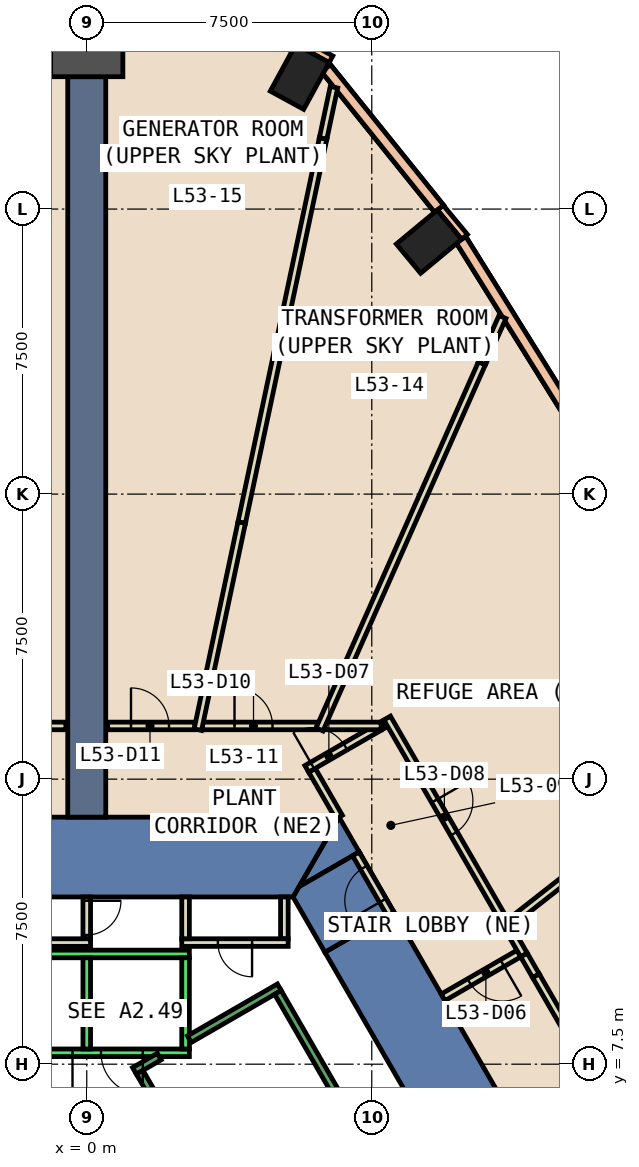
"""IFC4 building model, lengths in metres.
Left out: names, types, materials, properties, quantities, classifications, styles, units other than length and angle.
Written with IfcOpenShell. Run it as: python <this file> out.ifc"""

import sys

from ifc_helpers import new_model, si_unit, direction, frame, frame_2d, origin, origin_2d, place, context, subcontext, project, spatial, polyline, rectangle, outline, extrude, element, fill, save


model = new_model("IFC4")
c1 = context("Model", 3, precision=1e-05, world=origin(), true_north=direction((0.0, 1.0)))
c2 = subcontext(c1, "Body", "Model", "MODEL_VIEW")
j1 = project(units=[si_unit("LENGTHUNIT", "METRE"), si_unit("PLANEANGLEUNIT", "RADIAN")], contexts=[c1])
p1 = place(None, origin())
s1 = spatial("IfcSite", under=j1, at=p1, CompositionType="ELEMENT")
p2 = place(p1, origin())
s2 = spatial("IfcBuilding", under=s1, at=p2, CompositionType="ELEMENT")
p3 = place(p2, frame((0.0, 0.0, 236.0)))
s3 = spatial("IfcBuildingStorey", under=s2, at=p3, CompositionType="ELEMENT", Elevation=236.0)
for number, where, z_axis, x_axis in (
    (1, (9.005, 29.143, -0.6), (0.0, 0.0, 1.0), (-0.639, 0.769, 0.0)),
    (2, (5.604, 33.479, -0.6), (0.0, 0.0, 1.0), (-0.878, 0.478, 0.0)),
):
    element("IfcColumn", number, at=place(p3, frame(where, z_axis=z_axis, x_axis=x_axis)), inside=s3, PredefinedType="COLUMN", context=c2, shape_type="SweptSolid", body=[
        extrude(rectangle(XDim=1.0, YDim=1.4, at=origin_2d()), origin(), (0.0, 0.0, 1.0), 5.4),
    ])
p4 = place(p3, frame((0.0, 34.433, -0.6), z_axis=(0.0, 0.0, 1.0), x_axis=(0.0, 1.0, 0.0)))
e3 = element("IfcColumn", 3, at=p4, inside=s3, PredefinedType="COLUMN", context=c2, shape_type="SweptSolid", body=[
    extrude(rectangle(XDim=1.9, YDim=1.9, at=origin_2d()), origin(), (0.0, 0.0, 1.0), 5.4),
])
p5 = place(p3, frame((0.0, 0.0, -0.6)))
e4 = element("IfcWall", 4, at=p5, inside=s3, PredefinedType="SHEAR", context=c2, shape_type="SweptSolid", body=[
    extrude(outline(polyline([(8.085, 11.498), (6.266, 10.447), (10.854, 2.5), (13.279, 2.5), (8.085, 11.498)])), origin(), (0.0, 0.0, 1.0), 5.4),
])
p6 = place(p3, frame((0.0, 0.0, -0.6)))
e5 = element("IfcWall", 5, at=p6, inside=s3, PredefinedType="SHEAR", context=c2, shape_type="SweptSolid", body=[
    extrude(outline(polyline([(5.58, 12.165), (7.17, 13.083), (6.64, 14.0), (5.58, 12.165)])), origin(), (0.0, 0.0, 1.0), 5.4),
])
p7 = place(p3, frame((0.0, 0.0, 3.6)))
e6 = element("IfcWall", 6, at=p7, inside=s3, PredefinedType="SHEAR", context=c2, shape_type="SweptSolid", body=[
    extrude(outline(polyline([(7.17, 13.083), (5.58, 12.165), (5.427, 11.9), (6.266, 10.447), (8.085, 11.498), (7.17, 13.083)])), origin(), (0.0, 0.0, 1.0), 1.2),
])
p8 = place(p3, frame((0.0, 0.0, -0.6)))
e7 = element("IfcWall", 7, at=p8, inside=s3, PredefinedType="SHEAR", context=c2, shape_type="SweptSolid", body=[
    extrude(outline(polyline([(6.64, 14.0), (-6.64, 14.0), (-5.427, 11.9), (5.427, 11.9), (6.64, 14.0)])), origin(), (0.0, 0.0, 1.0), 5.4),
])
p9 = place(p3, frame((0.0, 14.0, 0.0), z_axis=(0.0, 0.0, 1.0), x_axis=(0.0, 1.0, 0.0)))
e8 = element("IfcWall", 8, at=p9, inside=s3, PredefinedType="SHEAR", context=c2, shape_type="SweptSolid", body=[
    extrude(rectangle(XDim=19.483, YDim=1.0, at=frame_2d((9.741, 0.0))), origin(), (0.0, 0.0, 1.0), 4.8),
])
p10 = place(p3, frame((6.426, 33.942, 0.0), z_axis=(0.0, 0.0, 1.0), x_axis=(-0.878250009632, 0.478201757191, 0.0)))
e9 = element("IfcWall", 9, at=p10, inside=s3, PredefinedType="STANDARD", context=c2, shape_type="SweptSolid", body=[
    extrude(rectangle(XDim=1.0, YDim=0.2, at=frame_2d((0.5, 0.0))), origin(), (0.0, 0.0, 1.0), 4.8),
])
p11 = place(p3, frame((9.94, 29.269, 0.0), z_axis=(0.0, 0.0, 1.0), x_axis=(-0.637972365578, 0.770059257953, 0.0)))
e10 = element("IfcWall", 10, at=p11, inside=s3, PredefinedType="STANDARD", context=c2, shape_type="SweptSolid", body=[
    extrude(rectangle(XDim=1.0, YDim=0.2, at=frame_2d((0.5, 0.0))), origin(), (0.0, 0.0, 1.0), 4.8),
])
p12 = place(p3, frame((13.799, 22.855, 0.0), z_axis=(0.0, 0.0, 1.0), x_axis=(-0.528961462244, 0.848645845722, 0.0)))
e11 = element("IfcWall", 11, at=p12, inside=s3, PredefinedType="STANDARD", context=c2, shape_type="SweptSolid", body=[
    extrude(rectangle(XDim=7.47, YDim=0.3, at=frame_2d((3.735, 0.0))), origin(), (0.0, 0.0, 1.0), 1.2),
])
p13 = place(p3, frame((13.799, 22.855, 4.0), z_axis=(0.0, 0.0, 1.0), x_axis=(-0.528961462244, 0.848645845722, 0.0)))
e12 = element("IfcWall", 12, at=p13, inside=s3, PredefinedType="STANDARD", context=c2, shape_type="SweptSolid", body=[
    extrude(rectangle(XDim=7.47, YDim=0.3, at=frame_2d((3.735, 0.0))), origin(), (0.0, 0.0, 1.0), 0.8),
])
p14 = place(p3, frame((9.27, 30.011, 0.0), z_axis=(0.0, 0.0, 1.0), x_axis=(-0.627115312033, 0.778926431323, 0.0)))
e13 = element("IfcWall", 13, at=p14, inside=s3, PredefinedType="STANDARD", context=c2, shape_type="SweptSolid", body=[
    extrude(rectangle(XDim=4.742, YDim=0.3, at=frame_2d((2.371, 0.0))), origin(), (0.0, 0.0, 1.0), 1.2),
])
p15 = place(p3, frame((9.27, 30.011, 4.0), z_axis=(0.0, 0.0, 1.0), x_axis=(-0.627115312033, 0.778926431323, 0.0)))
e14 = element("IfcWall", 14, at=p15, inside=s3, PredefinedType="STANDARD", context=c2, shape_type="SweptSolid", body=[
    extrude(rectangle(XDim=4.742, YDim=0.3, at=frame_2d((2.371, 0.0))), origin(), (0.0, 0.0, 1.0), 0.8),
])
p16 = place(p3, frame((5.2, 11.9, 0.0), z_axis=(0.0, 0.0, 1.0), x_axis=(0.0, -1.0, 0.0)))
e15 = element("IfcWall", 15, at=p16, inside=s3, PredefinedType="PARTITIONING", context=c2, shape_type="SweptSolid", body=[
    extrude(rectangle(XDim=1.1, YDim=0.2, at=frame_2d((0.55, 0.0))), origin(), (0.0, 0.0, 1.0), 4.8),
])
p17 = place(p3, frame((5.3, 10.7, 0.0), z_axis=(0.0, 0.0, 1.0), x_axis=(-1.0, 0.0, 0.0)))
e16 = element("IfcWall", 16, at=p17, inside=s3, PredefinedType="PARTITIONING", context=c2, shape_type="SweptSolid", body=[
    extrude(rectangle(XDim=2.8, YDim=0.2, at=frame_2d((1.4, 0.0))), origin(), (0.0, 0.0, 1.0), 4.8),
])
p18 = place(p17, frame((0.95, 0.0, 0.0)))
e17 = element("IfcOpeningElement", 17, at=p18, cuts=e16, PredefinedType="OPENING", context=c2, shape_type="SweptSolid", body=[
    extrude(rectangle(XDim=0.9, YDim=2.1, at=frame_2d((0.45, 1.05))), frame((0.0, 0.11, 0.0), z_axis=(0.0, -1.0, 0.0), x_axis=(1.0, 0.0, 0.0)), (0.0, 0.0, 1.0), 0.22),
])
p19 = place(p3, frame((2.6, 10.8, 0.0), z_axis=(0.0, 0.0, 1.0), x_axis=(0.0, 1.0, 0.0)))
e18 = element("IfcWall", 18, at=p19, inside=s3, PredefinedType="PARTITIONING", context=c2, shape_type="SweptSolid", body=[
    extrude(rectangle(XDim=1.1, YDim=0.2, at=frame_2d((0.55, 0.0))), origin(), (0.0, 0.0, 1.0), 4.8),
])
p20 = place(p3, frame((0.0, 11.9, 0.0), z_axis=(0.0, 0.0, 1.0), x_axis=(0.0, -1.0, 0.0)))
e19 = element("IfcWall", 19, at=p20, inside=s3, PredefinedType="PARTITIONING", context=c2, shape_type="SweptSolid", body=[
    extrude(rectangle(XDim=1.1, YDim=0.2, at=frame_2d((0.55, 0.0))), origin(), (0.0, 0.0, 1.0), 4.8),
])
p21 = place(p20, frame((0.1, 0.0, 0.0)))
e20 = element("IfcOpeningElement", 20, at=p21, cuts=e19, PredefinedType="OPENING", context=c2, shape_type="SweptSolid", body=[
    extrude(rectangle(XDim=0.9, YDim=2.1, at=frame_2d((0.45, 1.05))), frame((0.0, 0.11, 0.0), z_axis=(0.0, -1.0, 0.0), x_axis=(1.0, 0.0, 0.0)), (0.0, 0.0, 1.0), 0.22),
])
p22 = place(p3, frame((0.1, 10.7, 0.0), z_axis=(0.0, 0.0, 1.0), x_axis=(-1.0, 0.0, 0.0)))
e21 = element("IfcWall", 21, at=p22, inside=s3, PredefinedType="PARTITIONING", context=c2, shape_type="SweptSolid", body=[
    extrude(rectangle(XDim=2.8, YDim=0.2, at=frame_2d((1.4, 0.0))), origin(), (0.0, 0.0, 1.0), 4.8),
])
p23 = place(p3, frame((11.455, 10.459, 0.0), z_axis=(0.0, 0.0, 1.0), x_axis=(-0.865999212041, -0.500045362686, 0.0)))
e22 = element("IfcWall", 22, at=p23, inside=s3, PredefinedType="PARTITIONING", context=c2, shape_type="SweptSolid", body=[
    extrude(rectangle(XDim=2.4, YDim=0.2, at=frame_2d((1.2, 0.0))), origin(), (0.0, 0.0, 1.0), 2.4),
])
p24 = place(p23, frame((0.6, 0.0, 0.0)))
e23 = element("IfcOpeningElement", 23, at=p24, cuts=e22, PredefinedType="OPENING", context=c2, shape_type="SweptSolid", body=[
    extrude(rectangle(XDim=1.0, YDim=2.1, at=frame_2d((0.5, 1.05))), frame((0.0, 0.11, 0.0), z_axis=(0.0, -1.0, 0.0), x_axis=(1.0, 0.0, 0.0)), (0.0, 0.0, 1.0), 0.22),
])
p25 = place(p3, frame((6.64, 14.0, 0.0), z_axis=(0.0, 0.0, 1.0), x_axis=(-0.500266180458, 0.865871669874, 0.0)))
e24 = element("IfcWall", 24, at=p25, inside=s3, PredefinedType="PARTITIONING", context=c2, shape_type="SweptSolid", body=[
    extrude(rectangle(XDim=1.425, YDim=0.2, at=frame_2d((0.712, 0.0))), origin(), (0.0, 0.0, 1.0), 4.8),
])
p26 = place(p3, frame((5.79, 15.271, 0.0), z_axis=(0.0, 0.0, 1.0), x_axis=(0.866023505087, 0.500003288626, 0.0)))
e25 = element("IfcWall", 25, at=p26, inside=s3, PredefinedType="PARTITIONING", context=c2, shape_type="SweptSolid", body=[
    extrude(rectangle(XDim=2.358, YDim=0.2, at=frame_2d((1.179, 0.0))), origin(), (0.0, 0.0, 1.0), 4.8),
])
p27 = place(p26, frame((0.171, 0.0, 0.0)))
e26 = element("IfcOpeningElement", 26, at=p27, cuts=e25, PredefinedType="OPENING", context=c2, shape_type="SweptSolid", body=[
    extrude(rectangle(XDim=1.0, YDim=2.1, at=frame_2d((0.5, 1.05))), frame((0.0, 0.11, 0.0), z_axis=(0.0, -1.0, 0.0), x_axis=(1.0, 0.0, 0.0)), (0.0, 0.0, 1.0), 0.22),
])
p28 = place(p3, frame((7.905, 16.608, 0.0), z_axis=(0.0, 0.0, 1.0), x_axis=(0.499957262057, -0.866050077142, 0.0)))
e27 = element("IfcWall", 27, at=p28, inside=s3, PredefinedType="PARTITIONING", context=c2, shape_type="SweptSolid", body=[
    extrude(rectangle(XDim=7.2, YDim=0.2, at=frame_2d((3.6, 0.0))), origin(), (0.0, 0.0, 1.0), 4.8),
])
p29 = place(p28, frame((2.512, 0.0, 0.0)))
e28 = element("IfcOpeningElement", 28, at=p29, cuts=e27, PredefinedType="OPENING", context=c2, shape_type="SweptSolid", body=[
    extrude(rectangle(XDim=1.0, YDim=2.1, at=frame_2d((0.5, 1.05))), frame((0.0, 0.11, 0.0), z_axis=(0.0, -1.0, 0.0), x_axis=(1.0, 0.0, 0.0)), (0.0, 0.0, 1.0), 0.22),
])
p30 = place(p3, frame((11.505, 10.372, 0.0), z_axis=(0.0, 0.0, 1.0), x_axis=(0.500335529221, -0.865831599215, 0.0)))
e29 = element("IfcWall", 29, at=p30, inside=s3, PredefinedType="PARTITIONING", context=c2, shape_type="SweptSolid", body=[
    extrude(rectangle(XDim=0.632, YDim=0.2, at=frame_2d((0.316, 0.0))), origin(), (0.0, 0.0, 1.0), 2.4),
])
p31 = place(p3, frame((6.266, 16.4, 0.0), z_axis=(0.0, 0.0, 1.0), x_axis=(1.0, 0.0, 0.0)))
e30 = element("IfcWall", 30, at=p31, inside=s3, PredefinedType="PARTITIONING", context=c2, shape_type="SweptSolid", body=[
    extrude(rectangle(XDim=1.479, YDim=0.2, at=frame_2d((0.74, 0.0))), origin(), (0.0, 0.0, 1.0), 4.8),
])
p32 = place(p3, frame((3.044, 16.4, 0.0), z_axis=(0.0, 0.0, 1.0), x_axis=(1.0, 0.0, 0.0)))
e31 = element("IfcWall", 31, at=p32, inside=s3, PredefinedType="PARTITIONING", context=c2, shape_type="SweptSolid", body=[
    extrude(rectangle(XDim=3.022, YDim=0.2, at=frame_2d((1.511, 0.0))), origin(), (0.0, 0.0, 1.0), 4.8),
])
p33 = place(p32, frame((0.844, 0.0, 0.0)))
e32 = element("IfcOpeningElement", 32, at=p33, cuts=e31, PredefinedType="OPENING", context=c2, shape_type="SweptSolid", body=[
    extrude(rectangle(XDim=1.0, YDim=2.1, at=frame_2d((0.5, 1.05))), frame((0.0, 0.11, 0.0), z_axis=(0.0, -1.0, 0.0), x_axis=(1.0, 0.0, 0.0)), (0.0, 0.0, 1.0), 0.22),
])
p34 = place(p3, frame((0.55, 16.4, 0.0), z_axis=(0.0, 0.0, 1.0), x_axis=(1.0, 0.0, 0.0)))
e33 = element("IfcWall", 33, at=p34, inside=s3, PredefinedType="PARTITIONING", context=c2, shape_type="SweptSolid", body=[
    extrude(rectangle(XDim=2.294, YDim=0.2, at=frame_2d((1.147, 0.0))), origin(), (0.0, 0.0, 1.0), 4.8),
])
p35 = place(p34, frame((0.614, 0.0, 0.0)))
e34 = element("IfcOpeningElement", 34, at=p35, cuts=e33, PredefinedType="OPENING", context=c2, shape_type="SweptSolid", body=[
    extrude(rectangle(XDim=1.0, YDim=2.1, at=frame_2d((0.5, 1.05))), frame((0.0, 0.11, 0.0), z_axis=(0.0, -1.0, 0.0), x_axis=(1.0, 0.0, 0.0)), (0.0, 0.0, 1.0), 0.22),
])
p36 = place(p3, frame((6.125, 16.309, 0.0), z_axis=(0.0, 0.0, 1.0), x_axis=(0.405480740136, 0.914103587882, 0.0)))
e35 = element("IfcWall", 35, at=p36, inside=s3, PredefinedType="PARTITIONING", context=c2, shape_type="SweptSolid", body=[
    extrude(rectangle(XDim=10.54, YDim=0.2, at=frame_2d((5.27, 0.0))), origin(), (0.0, 0.0, 1.0), 4.8),
])
p37 = place(p3, frame((2.923, 16.302, 0.0), z_axis=(0.0, 0.0, 1.0), x_axis=(0.207251352571, 0.97828772703, 0.0)))
e36 = element("IfcWall", 36, at=p37, inside=s3, PredefinedType="PARTITIONING", context=c2, shape_type="SweptSolid", body=[
    extrude(rectangle(XDim=5.572, YDim=0.2, at=frame_2d((2.786, 0.0))), origin(), (0.0, 0.0, 1.0), 2.4),
])
p38 = place(p3, frame((7.998, 11.448, 0.0), z_axis=(0.0, 0.0, 1.0), x_axis=(-0.500215337403, 0.865901042976, 0.0)))
e37 = element("IfcWall", 37, at=p38, inside=s3, PredefinedType="PARTITIONING", context=c2, shape_type="SweptSolid", body=[
    extrude(rectangle(XDim=1.829, YDim=0.2, at=frame_2d((0.915, 0.0))), origin(), (0.0, 0.0, 1.0), 2.4),
])
p39 = place(p38, frame((0.415, 0.0, 0.0)))
e38 = element("IfcOpeningElement", 38, at=p39, cuts=e37, PredefinedType="OPENING", context=c2, shape_type="SweptSolid", body=[
    extrude(rectangle(XDim=1.0, YDim=2.1, at=frame_2d((0.5, 1.05))), frame((0.0, 0.11, 0.0), z_axis=(0.0, -1.0, 0.0), x_axis=(1.0, 0.0, 0.0)), (0.0, 0.0, 1.0), 0.22),
])
p40 = place(p3, frame((11.821, 9.825, 0.0), z_axis=(0.0, 0.0, 1.0), x_axis=(0.500015573243, -0.866016412382, 0.0)))
e39 = element("IfcWall", 39, at=p40, inside=s3, PredefinedType="PARTITIONING", context=c2, shape_type="SweptSolid", body=[
    extrude(rectangle(XDim=4.254, YDim=0.2, at=frame_2d((2.127, 0.0))), origin(), (0.0, 0.0, 1.0), 4.8),
])
p41 = place(p3, frame((16.738, 15.615, 0.0), z_axis=(0.0, 0.0, 1.0), x_axis=(-0.787145477979, -0.616767376323, 0.0)))
e40 = element("IfcWall", 40, at=p41, inside=s3, PredefinedType="PARTITIONING", context=c2, shape_type="SweptSolid", body=[
    extrude(rectangle(XDim=7.225, YDim=0.2, at=frame_2d((3.612, 0.0))), origin(), (0.0, 0.0, 1.0), 4.8),
])
p42 = place(p3, frame((10.399, 25.944, 0.0), z_axis=(0.0, 0.0, 1.0), x_axis=(0.405661971111, 0.914023175414, 0.0)))
e41 = element("IfcWall", 41, at=p42, inside=s3, PredefinedType="PARTITIONING", context=c2, shape_type="SweptSolid", body=[
    extrude(rectangle(XDim=1.331, YDim=0.2, at=frame_2d((0.666, 0.0))), origin(), (0.0, 0.0, 1.0), 2.4),
])
p43 = place(p3, frame((4.078, 21.753, 0.0), z_axis=(0.0, 0.0, 1.0), x_axis=(0.207313040937, 0.978274656248, 0.0)))
e42 = element("IfcWall", 42, at=p43, inside=s3, PredefinedType="PARTITIONING", context=c2, shape_type="SweptSolid", body=[
    extrude(rectangle(XDim=10.333, YDim=0.2, at=frame_2d((5.166, 0.0))), origin(), (0.0, 0.0, 1.0), 4.8),
])
p44 = place(p3, frame((6.22, 31.861, 0.0), z_axis=(0.0, 0.0, 1.0), x_axis=(0.207236425439, 0.978290889241, 0.0)))
e43 = element("IfcWall", 43, at=p44, inside=s3, PredefinedType="PARTITIONING", context=c2, shape_type="SweptSolid", body=[
    extrude(rectangle(XDim=1.375, YDim=0.2, at=frame_2d((0.688, 0.0))), origin(), (0.0, 0.0, 1.0), 2.4),
])
p45 = place(p3, frame((-2.065, 16.4, 0.0), z_axis=(0.0, 0.0, 1.0), x_axis=(1.0, 0.0, 0.0)))
e44 = element("IfcWall", 44, at=p45, inside=s3, PredefinedType="PARTITIONING", context=c2, shape_type="SweptSolid", body=[
    extrude(rectangle(XDim=1.515, YDim=0.2, at=frame_2d((0.757, 0.0))), origin(), (0.0, 0.0, 1.0), 4.8),
])
p46 = place(p3, frame((2.7, 7.8, 0.0), z_axis=(0.0, 0.0, 1.0), x_axis=(-1.0, 0.0, 0.0)))
e45 = element("IfcWall", 45, at=p46, inside=s3, PredefinedType="STANDARD", context=c2, shape_type="SweptSolid", body=[
    extrude(rectangle(XDim=5.4, YDim=0.2, at=frame_2d((2.7, 0.0))), origin(), (0.0, 0.0, 1.0), 4.8),
])
p47 = place(p46, frame((1.225, 0.0, 0.0)))
e46 = element("IfcOpeningElement", 46, at=p47, cuts=e45, PredefinedType="OPENING", context=c2, shape_type="SweptSolid", body=[
    extrude(rectangle(XDim=1.1, YDim=2.1, at=frame_2d((0.55, 1.05))), frame((0.0, 0.11, 0.0), z_axis=(0.0, -1.0, 0.0), x_axis=(1.0, 0.0, 0.0)), (0.0, 0.0, 1.0), 0.22),
])
p48 = place(p46, frame((3.075, 0.0, 0.0)))
e47 = element("IfcOpeningElement", 47, at=p48, cuts=e45, PredefinedType="OPENING", context=c2, shape_type="SweptSolid", body=[
    extrude(rectangle(XDim=1.1, YDim=2.1, at=frame_2d((0.55, 1.05))), frame((0.0, 0.11, 0.0), z_axis=(0.0, -1.0, 0.0), x_axis=(1.0, 0.0, 0.0)), (0.0, 0.0, 1.0), 0.22),
])
p49 = place(p3, frame((2.7, 10.4, 0.0), z_axis=(0.0, 0.0, 1.0), x_axis=(-1.0, 0.0, 0.0)))
e48 = element("IfcWall", 48, at=p49, inside=s3, PredefinedType="STANDARD", context=c2, shape_type="SweptSolid", body=[
    extrude(rectangle(XDim=5.4, YDim=0.2, at=frame_2d((2.7, 0.0))), origin(), (0.0, 0.0, 1.0), 4.8),
])
for number, where, z_axis, x_axis in (
    (49, (2.6, 7.9, 0.0), (0.0, 0.0, 1.0), (0.0, 1.0, 0.0)),
    (50, (0.0, 7.9, 0.0), (0.0, 0.0, 1.0), (0.0, 1.0, 0.0)),
):
    element("IfcWall", number, at=place(p3, frame(where, z_axis=z_axis, x_axis=x_axis)), inside=s3, PredefinedType="STANDARD", context=c2, shape_type="SweptSolid", body=[
        extrude(rectangle(XDim=2.4, YDim=0.2, at=frame_2d((1.2, 0.0))), origin(), (0.0, 0.0, 1.0), 4.8),
    ])
p50 = place(p3, frame((2.7, 8.158, 0.0), z_axis=(0.0, 0.0, 1.0), x_axis=(0.86611865017, 0.499838457731, 0.0)))
e51 = element("IfcWall", 51, at=p50, inside=s3, PredefinedType="STANDARD", context=c2, shape_type="SweptSolid", body=[
    extrude(rectangle(XDim=2.733, YDim=0.2, at=frame_2d((1.366, 0.0))), origin(), (0.0, 0.0, 1.0), 4.8),
])
p51 = place(p3, frame((1.256, 7.324, 0.0), z_axis=(0.0, 0.0, 1.0), x_axis=(0.865915093549, 0.500191014278, 0.0)))
e52 = element("IfcWall", 52, at=p51, inside=s3, PredefinedType="STANDARD", context=c2, shape_type="SweptSolid", body=[
    extrude(rectangle(XDim=0.752, YDim=0.2, at=frame_2d((0.376, 0.0))), origin(), (0.0, 0.0, 1.0), 4.8),
])
p52 = place(p3, frame((4.843, 1.312, 0.0), z_axis=(0.0, 0.0, 1.0), x_axis=(-0.499963383562, 0.866046543262, 0.0)))
e53 = element("IfcWall", 53, at=p52, inside=s3, PredefinedType="STANDARD", context=c2, shape_type="SweptSolid", body=[
    extrude(rectangle(XDim=6.9, YDim=0.2, at=frame_2d((3.45, 0.0))), origin(), (0.0, 0.0, 1.0), 4.8),
])
p53 = place(p52, frame((0.45, 0.0, 0.0)))
e54 = element("IfcOpeningElement", 54, at=p53, cuts=e53, PredefinedType="OPENING", context=c2, shape_type="SweptSolid", body=[
    extrude(rectangle(XDim=1.1, YDim=2.2, at=frame_2d((0.55, 1.1))), frame((0.0, 0.11, 0.0), z_axis=(0.0, -1.0, 0.0), x_axis=(1.0, 0.0, 0.0)), (0.0, 0.0, 1.0), 0.22),
])
p54 = place(p3, frame((8.48, 3.412, 0.0), z_axis=(0.0, 0.0, 1.0), x_axis=(-0.499978703459, 0.866037698999, 0.0)))
e55 = element("IfcWall", 55, at=p54, inside=s3, PredefinedType="STANDARD", context=c2, shape_type="SweptSolid", body=[
    extrude(rectangle(XDim=6.9, YDim=0.2, at=frame_2d((3.45, 0.0))), origin(), (0.0, 0.0, 1.0), 4.8),
])
p55 = place(p24, origin())
e56 = element("IfcDoor", 56, at=p55, inside=s3, OperationType="SINGLE_SWING_RIGHT", PredefinedType="DOOR", context=c2, shape_type="SweptSolid", body=[
    extrude(rectangle(XDim=1.0, YDim=2.1, at=frame_2d((0.5, 1.05))), frame((0.0, 0.025, 0.0), z_axis=(0.0, -1.0, 0.0), x_axis=(1.0, 0.0, 0.0)), (0.0, 0.0, 1.0), 0.05),
])
fill(e23, e56)
p56 = place(p27, origin())
e57 = element("IfcDoor", 57, at=p56, inside=s3, OperationType="SINGLE_SWING_LEFT", PredefinedType="DOOR", context=c2, shape_type="SweptSolid", body=[
    extrude(rectangle(XDim=1.0, YDim=2.1, at=frame_2d((0.5, 1.05))), frame((0.0, 0.025, 0.0), z_axis=(0.0, -1.0, 0.0), x_axis=(1.0, 0.0, 0.0)), (0.0, 0.0, 1.0), 0.05),
])
fill(e26, e57)
p57 = place(p29, origin())
e58 = element("IfcDoor", 58, at=p57, inside=s3, OperationType="SINGLE_SWING_RIGHT", PredefinedType="DOOR", context=c2, shape_type="SweptSolid", body=[
    extrude(rectangle(XDim=1.0, YDim=2.1, at=frame_2d((0.5, 1.05))), frame((0.0, 0.025, 0.0), z_axis=(0.0, -1.0, 0.0), x_axis=(1.0, 0.0, 0.0)), (0.0, 0.0, 1.0), 0.05),
])
fill(e28, e58)
p58 = place(p33, origin())
e59 = element("IfcDoor", 59, at=p58, inside=s3, OperationType="SINGLE_SWING_RIGHT", PredefinedType="DOOR", context=c2, shape_type="SweptSolid", body=[
    extrude(rectangle(XDim=1.0, YDim=2.1, at=frame_2d((0.5, 1.05))), frame((0.0, 0.025, 0.0), z_axis=(0.0, -1.0, 0.0), x_axis=(1.0, 0.0, 0.0)), (0.0, 0.0, 1.0), 0.05),
])
fill(e32, e59)
p59 = place(p35, origin())
e60 = element("IfcDoor", 60, at=p59, inside=s3, OperationType="SINGLE_SWING_LEFT", PredefinedType="DOOR", context=c2, shape_type="SweptSolid", body=[
    extrude(rectangle(XDim=1.0, YDim=2.1, at=frame_2d((0.5, 1.05))), frame((0.0, 0.025, 0.0), z_axis=(0.0, -1.0, 0.0), x_axis=(1.0, 0.0, 0.0)), (0.0, 0.0, 1.0), 0.05),
])
fill(e34, e60)
p60 = place(p18, origin())
e61 = element("IfcDoor", 61, at=p60, inside=s3, OperationType="SINGLE_SWING_RIGHT", PredefinedType="DOOR", context=c2, shape_type="SweptSolid", body=[
    extrude(rectangle(XDim=0.9, YDim=2.1, at=frame_2d((0.45, 1.05))), frame((0.0, 0.025, 0.0), z_axis=(0.0, -1.0, 0.0), x_axis=(1.0, 0.0, 0.0)), (0.0, 0.0, 1.0), 0.05),
])
fill(e17, e61)
p61 = place(p21, origin())
e62 = element("IfcDoor", 62, at=p61, inside=s3, OperationType="SINGLE_SWING_LEFT", PredefinedType="DOOR", context=c2, shape_type="SweptSolid", body=[
    extrude(rectangle(XDim=0.9, YDim=2.1, at=frame_2d((0.45, 1.05))), frame((0.0, 0.025, 0.0), z_axis=(0.0, -1.0, 0.0), x_axis=(1.0, 0.0, 0.0)), (0.0, 0.0, 1.0), 0.05),
])
fill(e20, e62)
p62 = place(p39, origin())
e63 = element("IfcDoor", 63, at=p62, inside=s3, OperationType="SINGLE_SWING_LEFT", PredefinedType="DOOR", context=c2, shape_type="SweptSolid", body=[
    extrude(rectangle(XDim=1.0, YDim=2.1, at=frame_2d((0.5, 1.05))), frame((0.0, 0.025, 0.0), z_axis=(0.0, -1.0, 0.0), x_axis=(1.0, 0.0, 0.0)), (0.0, 0.0, 1.0), 0.05),
])
fill(e38, e63)
p63 = place(p47, origin())
e64 = element("IfcDoor", 64, at=p63, inside=s3, OperationType="SLIDING_TO_LEFT", PredefinedType="DOOR", context=c2, shape_type="SweptSolid", body=[
    extrude(rectangle(XDim=1.1, YDim=2.1, at=frame_2d((0.55, 1.05))), frame((0.0, 0.025, 0.0), z_axis=(0.0, -1.0, 0.0), x_axis=(1.0, 0.0, 0.0)), (0.0, 0.0, 1.0), 0.05),
])
fill(e46, e64)
p64 = place(p48, origin())
e65 = element("IfcDoor", 65, at=p64, inside=s3, OperationType="SLIDING_TO_LEFT", PredefinedType="DOOR", context=c2, shape_type="SweptSolid", body=[
    extrude(rectangle(XDim=1.1, YDim=2.1, at=frame_2d((0.55, 1.05))), frame((0.0, 0.025, 0.0), z_axis=(0.0, -1.0, 0.0), x_axis=(1.0, 0.0, 0.0)), (0.0, 0.0, 1.0), 0.05),
])
fill(e47, e65)
save(model, sys.argv[1])
